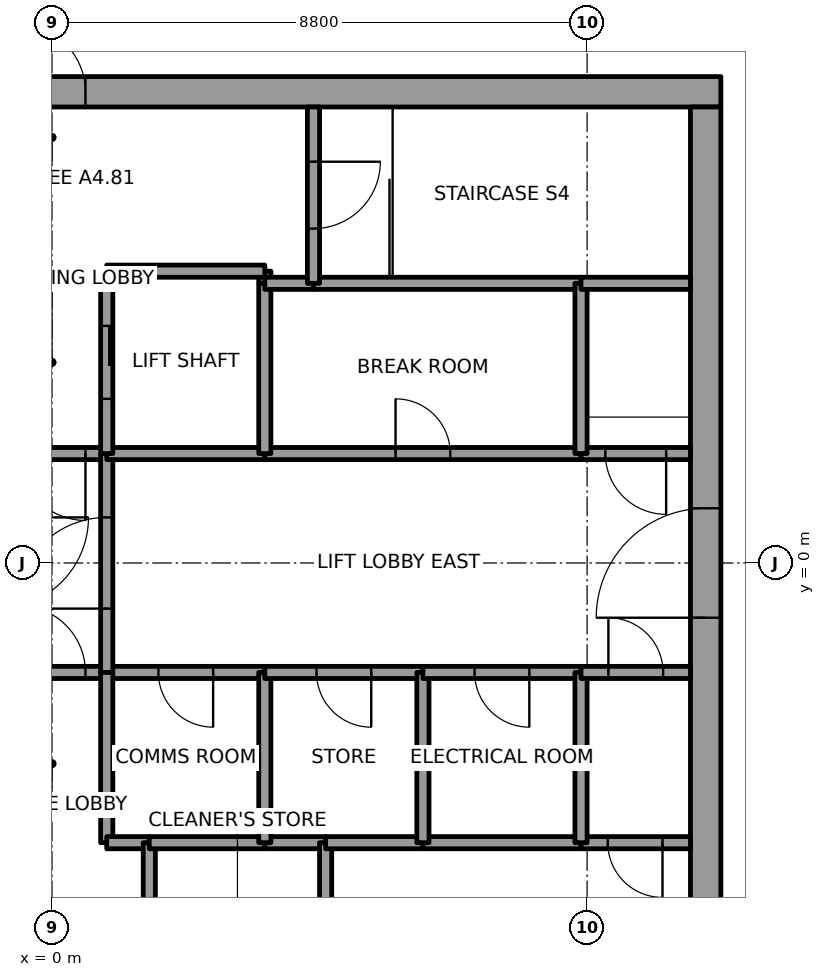
"""IFC4 building model, lengths in metres.
Left out: names, types, materials, properties, quantities, classifications, styles, units other than length and angle.
Written with IfcOpenShell. Run it as: python <this file> out.ifc"""

import sys

from ifc_helpers import new_model, si_unit, direction, frame, frame_2d, origin, place, context, subcontext, project, spatial, rectangle, extrude, element, fill, save


model = new_model("IFC4")
c1 = context("Model", 3, precision=1e-05, world=origin(), true_north=direction((0.0, 1.0)))
c2 = subcontext(c1, "Body", "Model", "MODEL_VIEW")
j1 = project(units=[si_unit("LENGTHUNIT", "METRE"), si_unit("PLANEANGLEUNIT", "RADIAN")], contexts=[c1])
p1 = place(None, origin())
s1 = spatial("IfcSite", under=j1, at=p1, CompositionType="ELEMENT")
p2 = place(p1, origin())
s2 = spatial("IfcBuilding", under=s1, at=p2, CompositionType="ELEMENT")
p3 = place(p2, frame((0.0, 0.0, 355.6)))
s3 = spatial("IfcBuildingStorey", under=s2, at=p3, CompositionType="ELEMENT", Elevation=355.6)
p4 = place(p3, frame((-11.0, 7.75, 0.0), z_axis=(0.0, 0.0, 1.0), x_axis=(1.0, 0.0, 0.0)))
e1 = element("IfcWall", 1, at=p4, inside=s3, PredefinedType="SHEAR", context=c2, shape_type="SweptSolid", body=[
    extrude(rectangle(XDim=22.0, YDim=0.5, at=frame_2d((11.0, 0.0))), origin(), (0.0, 0.0, 1.0), 5.4),
])
p5 = place(p4, frame((10.45, 0.0, 0.0)))
e2 = element("IfcOpeningElement", 2, at=p5, cuts=e1, PredefinedType="OPENING", context=c2, shape_type="SweptSolid", body=[
    extrude(rectangle(XDim=1.1, YDim=2.1, at=frame_2d((0.55, 1.05))), frame((0.0, 0.25, 0.0), z_axis=(0.0, -1.0, 0.0), x_axis=(1.0, 0.0, 0.0)), (0.0, 0.0, 1.0), 0.5),
])
p6 = place(p3, frame((10.75, -7.5, 0.0), z_axis=(0.0, 0.0, 1.0), x_axis=(0.0, 1.0, 0.0)))
e3 = element("IfcWall", 3, at=p6, inside=s3, PredefinedType="SHEAR", context=c2, shape_type="SweptSolid", body=[
    extrude(rectangle(XDim=15.0, YDim=0.5, at=frame_2d((7.5, 0.0))), origin(), (0.0, 0.0, 1.0), 5.4),
])
p7 = place(p6, frame((6.6, 0.0, 0.0)))
e4 = element("IfcOpeningElement", 4, at=p7, cuts=e3, PredefinedType="OPENING", context=c2, shape_type="SweptSolid", body=[
    extrude(rectangle(XDim=1.8, YDim=2.1, at=frame_2d((0.9, 1.05))), frame((0.0, 0.25, 0.0), z_axis=(0.0, -1.0, 0.0), x_axis=(1.0, 0.0, 0.0)), (0.0, 0.0, 1.0), 0.5),
])
p8 = place(p3, frame((-0.9, -1.8, 0.0), z_axis=(0.0, 0.0, 1.0), x_axis=(1.0, 0.0, 0.0)))
e5 = element("IfcWall", 5, at=p8, inside=s3, PredefinedType="SOLIDWALL", context=c2, shape_type="SweptSolid", body=[
    extrude(rectangle(XDim=1.8, YDim=0.2, at=frame_2d((0.9, 0.0))), origin(), (0.0, 0.0, 1.0), 5.25),
])
p9 = place(p8, frame((0.35, 0.0, 0.0)))
e6 = element("IfcOpeningElement", 6, at=p9, cuts=e5, PredefinedType="OPENING", context=c2, shape_type="SweptSolid", body=[
    extrude(rectangle(XDim=1.1, YDim=2.1, at=frame_2d((0.55, 1.05))), frame((0.0, 0.1, 0.0), z_axis=(0.0, -1.0, 0.0), x_axis=(1.0, 0.0, 0.0)), (0.0, 0.0, 1.0), 0.2),
])
p10 = place(p3, frame((0.9, 1.8, 0.0), z_axis=(0.0, 0.0, 1.0), x_axis=(-1.0, 0.0, 0.0)))
e7 = element("IfcWall", 7, at=p10, inside=s3, PredefinedType="SOLIDWALL", context=c2, shape_type="SweptSolid", body=[
    extrude(rectangle(XDim=1.8, YDim=0.2, at=frame_2d((0.9, 0.0))), origin(), (0.0, 0.0, 1.0), 5.25),
])
p11 = place(p10, frame((0.35, 0.0, 0.0)))
e8 = element("IfcOpeningElement", 8, at=p11, cuts=e7, PredefinedType="OPENING", context=c2, shape_type="SweptSolid", body=[
    extrude(rectangle(XDim=1.1, YDim=2.1, at=frame_2d((0.55, 1.05))), frame((0.0, 0.1, 0.0), z_axis=(0.0, -1.0, 0.0), x_axis=(1.0, 0.0, 0.0)), (0.0, 0.0, 1.0), 0.2),
])
p12 = place(p3, frame((3.5, -1.8, 0.0), z_axis=(0.0, 0.0, 1.0), x_axis=(-1.0, 0.0, 0.0)))
e9 = element("IfcWall", 9, at=p12, inside=s3, PredefinedType="SOLIDWALL", context=c2, shape_type="SweptSolid", body=[
    extrude(rectangle(XDim=2.6, YDim=0.2, at=frame_2d((1.3, 0.0))), origin(), (0.0, 0.0, 1.0), 5.25),
])
p13 = place(p12, frame((0.85, 0.0, 0.0)))
e10 = element("IfcOpeningElement", 10, at=p13, cuts=e9, PredefinedType="OPENING", context=c2, shape_type="SweptSolid", body=[
    extrude(rectangle(XDim=0.9, YDim=2.1, at=frame_2d((0.45, 1.05))), frame((0.0, 0.1, 0.0), z_axis=(0.0, -1.0, 0.0), x_axis=(1.0, 0.0, 0.0)), (0.0, 0.0, 1.0), 0.2),
])
p14 = place(p3, frame((0.9, -1.8, 0.0), z_axis=(0.0, 0.0, 1.0), x_axis=(0.0, 1.0, 0.0)))
e11 = element("IfcWall", 11, at=p14, inside=s3, PredefinedType="SOLIDWALL", context=c2, shape_type="SweptSolid", body=[
    extrude(rectangle(XDim=3.6, YDim=0.2, at=frame_2d((1.8, 0.0))), origin(), (0.0, 0.0, 1.0), 5.25),
])
p15 = place(p14, frame((1.05, 0.0, 0.0)))
e12 = element("IfcOpeningElement", 12, at=p15, cuts=e11, PredefinedType="OPENING", context=c2, shape_type="SweptSolid", body=[
    extrude(rectangle(XDim=1.5, YDim=2.1, at=frame_2d((0.75, 1.05))), frame((0.0, 0.1, 0.0), z_axis=(0.0, -1.0, 0.0), x_axis=(1.0, 0.0, 0.0)), (0.0, 0.0, 1.0), 0.2),
])
p16 = place(p3, frame((0.9, -1.8, 0.0), z_axis=(0.0, 0.0, 1.0), x_axis=(0.0, -1.0, 0.0)))
e13 = element("IfcWall", 13, at=p16, inside=s3, PredefinedType="SOLIDWALL", context=c2, shape_type="SweptSolid", body=[
    extrude(rectangle(XDim=2.8, YDim=0.2, at=frame_2d((1.4, 0.0))), origin(), (0.0, 0.0, 1.0), 5.25),
])
p17 = place(p3, frame((0.9, -4.6, 0.0), z_axis=(0.0, 0.0, 1.0), x_axis=(1.0, 0.0, 0.0)))
e14 = element("IfcWall", 14, at=p17, inside=s3, PredefinedType="SOLIDWALL", context=c2, shape_type="SweptSolid", body=[
    extrude(rectangle(XDim=0.7, YDim=0.2, at=frame_2d((0.35, 0.0))), origin(), (0.0, 0.0, 1.0), 5.25),
])
p18 = place(p3, frame((3.5, 1.8, 0.0), z_axis=(0.0, 0.0, 1.0), x_axis=(-1.0, 0.0, 0.0)))
e15 = element("IfcWall", 15, at=p18, inside=s3, PredefinedType="SOLIDWALL", context=c2, shape_type="SweptSolid", body=[
    extrude(rectangle(XDim=2.6, YDim=0.2, at=frame_2d((1.3, 0.0))), origin(), (0.0, 0.0, 1.0), 5.25),
])
p19 = place(p3, frame((3.5, 4.6, 0.0), z_axis=(0.0, 0.0, 1.0), x_axis=(0.0, 1.0, 0.0)))
e16 = element("IfcWall", 16, at=p19, inside=s3, PredefinedType="SOLIDWALL", context=c2, shape_type="SweptSolid", body=[
    extrude(rectangle(XDim=0.2, YDim=0.2, at=frame_2d((0.1, 0.0))), origin(), (0.0, 0.0, 1.0), 5.25),
])
p20 = place(p3, frame((3.5, 4.8, 0.0), z_axis=(0.0, 0.0, 1.0), x_axis=(-1.0, 0.0, 0.0)))
e17 = element("IfcWall", 17, at=p20, inside=s3, PredefinedType="SOLIDWALL", context=c2, shape_type="SweptSolid", body=[
    extrude(rectangle(XDim=2.6, YDim=0.2, at=frame_2d((1.3, 0.0))), origin(), (0.0, 0.0, 1.0), 5.25),
])
p21 = place(p3, frame((0.9, 4.8, 0.0), z_axis=(0.0, 0.0, 1.0), x_axis=(0.0, -1.0, 0.0)))
e18 = element("IfcWall", 18, at=p21, inside=s3, PredefinedType="SOLIDWALL", context=c2, shape_type="SweptSolid", body=[
    extrude(rectangle(XDim=3.0, YDim=0.2, at=frame_2d((1.5, 0.0))), origin(), (0.0, 0.0, 1.0), 5.25),
])
p22 = place(p21, frame((0.9, 0.0, 0.0)))
e19 = element("IfcOpeningElement", 19, at=p22, cuts=e18, PredefinedType="OPENING", context=c2, shape_type="SweptSolid", body=[
    extrude(rectangle(XDim=1.2, YDim=2.1, at=frame_2d((0.6, 1.05))), frame((0.0, 0.1, 0.0), z_axis=(0.0, -1.0, 0.0), x_axis=(1.0, 0.0, 0.0)), (0.0, 0.0, 1.0), 0.2),
])
p23 = place(p3, frame((1.6, -4.6, 0.0), z_axis=(0.0, 0.0, 1.0), x_axis=(0.0, -1.0, 0.0)))
e20 = element("IfcWall", 20, at=p23, inside=s3, PredefinedType="SOLIDWALL", context=c2, shape_type="SweptSolid", body=[
    extrude(rectangle(XDim=2.9, YDim=0.2, at=frame_2d((1.45, 0.0))), origin(), (0.0, 0.0, 1.0), 5.25),
])
p24 = place(p23, frame((1.0, 0.0, 0.0)))
e21 = element("IfcOpeningElement", 21, at=p24, cuts=e20, PredefinedType="OPENING", context=c2, shape_type="SweptSolid", body=[
    extrude(rectangle(XDim=0.9, YDim=2.1, at=frame_2d((0.45, 1.05))), frame((0.0, 0.1, 0.0), z_axis=(0.0, -1.0, 0.0), x_axis=(1.0, 0.0, 0.0)), (0.0, 0.0, 1.0), 0.2),
])
p25 = place(p3, frame((1.6, -4.6, 0.0), z_axis=(0.0, 0.0, 1.0), x_axis=(1.0, 0.0, 0.0)))
e22 = element("IfcWall", 22, at=p25, inside=s3, PredefinedType="SOLIDWALL", context=c2, shape_type="SweptSolid", body=[
    extrude(rectangle(XDim=1.9, YDim=0.2, at=frame_2d((0.95, 0.0))), origin(), (0.0, 0.0, 1.0), 5.25),
])
p26 = place(p3, frame((3.5, -4.6, 0.0), z_axis=(0.0, 0.0, 1.0), x_axis=(1.0, 0.0, 0.0)))
e23 = element("IfcWall", 23, at=p26, inside=s3, PredefinedType="SOLIDWALL", context=c2, shape_type="SweptSolid", body=[
    extrude(rectangle(XDim=1.0, YDim=0.2, at=frame_2d((0.5, 0.0))), origin(), (0.0, 0.0, 1.0), 5.25),
])
p27 = place(p3, frame((3.5, -4.6, 0.0), z_axis=(0.0, 0.0, 1.0), x_axis=(0.0, 1.0, 0.0)))
e24 = element("IfcWall", 24, at=p27, inside=s3, PredefinedType="SOLIDWALL", context=c2, shape_type="SweptSolid", body=[
    extrude(rectangle(XDim=2.8, YDim=0.2, at=frame_2d((1.4, 0.0))), origin(), (0.0, 0.0, 1.0), 5.25),
])
p28 = place(p3, frame((6.1, -1.8, 0.0), z_axis=(0.0, 0.0, 1.0), x_axis=(-1.0, 0.0, 0.0)))
e25 = element("IfcWall", 25, at=p28, inside=s3, PredefinedType="SOLIDWALL", context=c2, shape_type="SweptSolid", body=[
    extrude(rectangle(XDim=2.6, YDim=0.2, at=frame_2d((1.3, 0.0))), origin(), (0.0, 0.0, 1.0), 5.25),
])
p29 = place(p28, frame((0.85, 0.0, 0.0)))
e26 = element("IfcOpeningElement", 26, at=p29, cuts=e25, PredefinedType="OPENING", context=c2, shape_type="SweptSolid", body=[
    extrude(rectangle(XDim=0.9, YDim=2.1, at=frame_2d((0.45, 1.05))), frame((0.0, 0.1, 0.0), z_axis=(0.0, -1.0, 0.0), x_axis=(1.0, 0.0, 0.0)), (0.0, 0.0, 1.0), 0.2),
])
p30 = place(p3, frame((3.5, 1.8, 0.0), z_axis=(0.0, 0.0, 1.0), x_axis=(1.0, 0.0, 0.0)))
e27 = element("IfcWall", 27, at=p30, inside=s3, PredefinedType="SOLIDWALL", context=c2, shape_type="SweptSolid", body=[
    extrude(rectangle(XDim=5.2, YDim=0.2, at=frame_2d((2.6, 0.0))), origin(), (0.0, 0.0, 1.0), 5.25),
])
p31 = place(p30, frame((2.15, 0.0, 0.0)))
e28 = element("IfcOpeningElement", 28, at=p31, cuts=e27, PredefinedType="OPENING", context=c2, shape_type="SweptSolid", body=[
    extrude(rectangle(XDim=0.9, YDim=2.1, at=frame_2d((0.45, 1.05))), frame((0.0, 0.1, 0.0), z_axis=(0.0, -1.0, 0.0), x_axis=(1.0, 0.0, 0.0)), (0.0, 0.0, 1.0), 0.2),
])
p32 = place(p3, frame((3.5, 4.6, 0.0), z_axis=(0.0, 0.0, 1.0), x_axis=(0.0, -1.0, 0.0)))
e29 = element("IfcWall", 29, at=p32, inside=s3, PredefinedType="SOLIDWALL", context=c2, shape_type="SweptSolid", body=[
    extrude(rectangle(XDim=2.8, YDim=0.2, at=frame_2d((1.4, 0.0))), origin(), (0.0, 0.0, 1.0), 5.25),
])
p33 = place(p3, frame((4.3, 4.6, 0.0), z_axis=(0.0, 0.0, 1.0), x_axis=(-1.0, 0.0, 0.0)))
e30 = element("IfcWall", 30, at=p33, inside=s3, PredefinedType="SOLIDWALL", context=c2, shape_type="SweptSolid", body=[
    extrude(rectangle(XDim=0.8, YDim=0.2, at=frame_2d((0.4, 0.0))), origin(), (0.0, 0.0, 1.0), 5.25),
])
p34 = place(p3, frame((8.7, 4.6, 0.0), z_axis=(0.0, 0.0, 1.0), x_axis=(-1.0, 0.0, 0.0)))
e31 = element("IfcWall", 31, at=p34, inside=s3, PredefinedType="SOLIDWALL", context=c2, shape_type="SweptSolid", body=[
    extrude(rectangle(XDim=4.4, YDim=0.2, at=frame_2d((2.2, 0.0))), origin(), (0.0, 0.0, 1.0), 5.25),
])
p35 = place(p3, frame((4.3, 7.5, 0.0), z_axis=(0.0, 0.0, 1.0), x_axis=(0.0, -1.0, 0.0)))
e32 = element("IfcWall", 32, at=p35, inside=s3, PredefinedType="SOLIDWALL", context=c2, shape_type="SweptSolid", body=[
    extrude(rectangle(XDim=2.9, YDim=0.2, at=frame_2d((1.45, 0.0))), origin(), (0.0, 0.0, 1.0), 5.25),
])
p36 = place(p35, frame((0.9, 0.0, 0.0)))
e33 = element("IfcOpeningElement", 33, at=p36, cuts=e32, PredefinedType="OPENING", context=c2, shape_type="SweptSolid", body=[
    extrude(rectangle(XDim=1.1, YDim=2.1, at=frame_2d((0.55, 1.05))), frame((0.0, 0.1, 0.0), z_axis=(0.0, -1.0, 0.0), x_axis=(1.0, 0.0, 0.0)), (0.0, 0.0, 1.0), 0.2),
])
p37 = place(p3, frame((4.5, -4.6, 0.0), z_axis=(0.0, 0.0, 1.0), x_axis=(0.0, -1.0, 0.0)))
e34 = element("IfcWall", 34, at=p37, inside=s3, PredefinedType="SOLIDWALL", context=c2, shape_type="SweptSolid", body=[
    extrude(rectangle(XDim=2.9, YDim=0.2, at=frame_2d((1.45, 0.0))), origin(), (0.0, 0.0, 1.0), 5.25),
])
p38 = place(p3, frame((4.5, -4.6, 0.0), z_axis=(0.0, 0.0, 1.0), x_axis=(1.0, 0.0, 0.0)))
e35 = element("IfcWall", 35, at=p38, inside=s3, PredefinedType="SOLIDWALL", context=c2, shape_type="SweptSolid", body=[
    extrude(rectangle(XDim=1.6, YDim=0.2, at=frame_2d((0.8, 0.0))), origin(), (0.0, 0.0, 1.0), 5.25),
])
p39 = place(p3, frame((6.1, -4.6, 0.0), z_axis=(0.0, 0.0, 1.0), x_axis=(1.0, 0.0, 0.0)))
e36 = element("IfcWall", 36, at=p39, inside=s3, PredefinedType="SOLIDWALL", context=c2, shape_type="SweptSolid", body=[
    extrude(rectangle(XDim=2.6, YDim=0.2, at=frame_2d((1.3, 0.0))), origin(), (0.0, 0.0, 1.0), 5.25),
])
p40 = place(p3, frame((6.1, -4.6, 0.0), z_axis=(0.0, 0.0, 1.0), x_axis=(0.0, 1.0, 0.0)))
e37 = element("IfcWall", 37, at=p40, inside=s3, PredefinedType="SOLIDWALL", context=c2, shape_type="SweptSolid", body=[
    extrude(rectangle(XDim=2.8, YDim=0.2, at=frame_2d((1.4, 0.0))), origin(), (0.0, 0.0, 1.0), 5.25),
])
p41 = place(p3, frame((8.7, -1.8, 0.0), z_axis=(0.0, 0.0, 1.0), x_axis=(-1.0, 0.0, 0.0)))
e38 = element("IfcWall", 38, at=p41, inside=s3, PredefinedType="SOLIDWALL", context=c2, shape_type="SweptSolid", body=[
    extrude(rectangle(XDim=2.6, YDim=0.2, at=frame_2d((1.3, 0.0))), origin(), (0.0, 0.0, 1.0), 5.25),
])
p42 = place(p41, frame((0.85, 0.0, 0.0)))
e39 = element("IfcOpeningElement", 39, at=p42, cuts=e38, PredefinedType="OPENING", context=c2, shape_type="SweptSolid", body=[
    extrude(rectangle(XDim=0.9, YDim=2.1, at=frame_2d((0.45, 1.05))), frame((0.0, 0.1, 0.0), z_axis=(0.0, -1.0, 0.0), x_axis=(1.0, 0.0, 0.0)), (0.0, 0.0, 1.0), 0.2),
])
p43 = place(p3, frame((10.5, -4.6, 0.0), z_axis=(0.0, 0.0, 1.0), x_axis=(-1.0, 0.0, 0.0)))
e40 = element("IfcWall", 40, at=p43, inside=s3, PredefinedType="SOLIDWALL", context=c2, shape_type="SweptSolid", body=[
    extrude(rectangle(XDim=1.8, YDim=0.2, at=frame_2d((0.9, 0.0))), origin(), (0.0, 0.0, 1.0), 5.25),
])
p44 = place(p43, frame((0.46, 0.0, 0.0)))
e41 = element("IfcOpeningElement", 41, at=p44, cuts=e40, PredefinedType="OPENING", context=c2, shape_type="SweptSolid", body=[
    extrude(rectangle(XDim=0.9, YDim=2.1, at=frame_2d((0.45, 1.05))), frame((0.0, 0.1, 0.0), z_axis=(0.0, -1.0, 0.0), x_axis=(1.0, 0.0, 0.0)), (0.0, 0.0, 1.0), 0.2),
])
p45 = place(p3, frame((8.7, -4.6, 0.0), z_axis=(0.0, 0.0, 1.0), x_axis=(0.0, 1.0, 0.0)))
e42 = element("IfcWall", 42, at=p45, inside=s3, PredefinedType="SOLIDWALL", context=c2, shape_type="SweptSolid", body=[
    extrude(rectangle(XDim=2.8, YDim=0.2, at=frame_2d((1.4, 0.0))), origin(), (0.0, 0.0, 1.0), 5.25),
])
p46 = place(p3, frame((8.7, -1.8, 0.0), z_axis=(0.0, 0.0, 1.0), x_axis=(1.0, 0.0, 0.0)))
e43 = element("IfcWall", 43, at=p46, inside=s3, PredefinedType="SOLIDWALL", context=c2, shape_type="SweptSolid", body=[
    extrude(rectangle(XDim=1.8, YDim=0.2, at=frame_2d((0.9, 0.0))), origin(), (0.0, 0.0, 1.0), 5.25),
])
p47 = place(p46, frame((0.45, 0.0, 0.0)))
e44 = element("IfcOpeningElement", 44, at=p47, cuts=e43, PredefinedType="OPENING", context=c2, shape_type="SweptSolid", body=[
    extrude(rectangle(XDim=0.9, YDim=2.1, at=frame_2d((0.45, 1.05))), frame((0.0, 0.1, 0.0), z_axis=(0.0, -1.0, 0.0), x_axis=(1.0, 0.0, 0.0)), (0.0, 0.0, 1.0), 0.2),
])
p48 = place(p3, frame((10.5, 1.8, 0.0), z_axis=(0.0, 0.0, 1.0), x_axis=(-1.0, 0.0, 0.0)))
e45 = element("IfcWall", 45, at=p48, inside=s3, PredefinedType="SOLIDWALL", context=c2, shape_type="SweptSolid", body=[
    extrude(rectangle(XDim=1.8, YDim=0.2, at=frame_2d((0.9, 0.0))), origin(), (0.0, 0.0, 1.0), 5.25),
])
p49 = place(p48, frame((0.4, 0.0, 0.0)))
e46 = element("IfcOpeningElement", 46, at=p49, cuts=e45, PredefinedType="OPENING", context=c2, shape_type="SweptSolid", body=[
    extrude(rectangle(XDim=1.0, YDim=2.1, at=frame_2d((0.5, 1.05))), frame((0.0, 0.1, 0.0), z_axis=(0.0, -1.0, 0.0), x_axis=(1.0, 0.0, 0.0)), (0.0, 0.0, 1.0), 0.2),
])
p50 = place(p3, frame((8.7, 1.8, 0.0), z_axis=(0.0, 0.0, 1.0), x_axis=(0.0, 1.0, 0.0)))
e47 = element("IfcWall", 47, at=p50, inside=s3, PredefinedType="SOLIDWALL", context=c2, shape_type="SweptSolid", body=[
    extrude(rectangle(XDim=2.8, YDim=0.2, at=frame_2d((1.4, 0.0))), origin(), (0.0, 0.0, 1.0), 5.25),
])
p51 = place(p3, frame((10.5, 4.6, 0.0), z_axis=(0.0, 0.0, 1.0), x_axis=(-1.0, 0.0, 0.0)))
e48 = element("IfcWall", 48, at=p51, inside=s3, PredefinedType="SOLIDWALL", context=c2, shape_type="SweptSolid", body=[
    extrude(rectangle(XDim=1.8, YDim=0.2, at=frame_2d((0.9, 0.0))), origin(), (0.0, 0.0, 1.0), 5.25),
])
p52 = place(p22, origin())
e49 = element("IfcDoor", 49, at=p52, inside=s3, OperationType="SLIDING_TO_LEFT", PredefinedType="DOOR", context=c2, shape_type="SweptSolid", body=[
    extrude(rectangle(XDim=1.2, YDim=2.1, at=frame_2d((0.6, 1.05))), frame((0.0, 0.025, 0.0), z_axis=(0.0, -1.0, 0.0), x_axis=(1.0, 0.0, 0.0)), (0.0, 0.0, 1.0), 0.05),
])
fill(e19, e49)
p53 = place(p15, origin())
e50 = element("IfcDoor", 50, at=p53, inside=s3, OperationType="DOUBLE_DOOR_SINGLE_SWING", PredefinedType="DOOR", context=c2, shape_type="SweptSolid", body=[
    extrude(rectangle(XDim=1.5, YDim=2.1, at=frame_2d((0.75, 1.05))), frame((0.0, 0.025, 0.0), z_axis=(0.0, -1.0, 0.0), x_axis=(1.0, 0.0, 0.0)), (0.0, 0.0, 1.0), 0.05),
])
fill(e12, e50)
p54 = place(p11, origin())
e51 = element("IfcDoor", 51, at=p54, inside=s3, OperationType="SINGLE_SWING_RIGHT", PredefinedType="DOOR", context=c2, shape_type="SweptSolid", body=[
    extrude(rectangle(XDim=1.1, YDim=2.1, at=frame_2d((0.55, 1.05))), frame((0.0, 0.025, 0.0), z_axis=(0.0, -1.0, 0.0), x_axis=(1.0, 0.0, 0.0)), (0.0, 0.0, 1.0), 0.05),
])
fill(e8, e51)
p55 = place(p9, origin())
e52 = element("IfcDoor", 52, at=p55, inside=s3, OperationType="SINGLE_SWING_RIGHT", PredefinedType="DOOR", context=c2, shape_type="SweptSolid", body=[
    extrude(rectangle(XDim=1.1, YDim=2.1, at=frame_2d((0.55, 1.05))), frame((0.0, 0.025, 0.0), z_axis=(0.0, -1.0, 0.0), x_axis=(1.0, 0.0, 0.0)), (0.0, 0.0, 1.0), 0.05),
])
fill(e6, e52)
p56 = place(p49, origin())
e53 = element("IfcDoor", 53, at=p56, inside=s3, OperationType="SINGLE_SWING_LEFT", PredefinedType="DOOR", context=c2, shape_type="SweptSolid", body=[
    extrude(rectangle(XDim=1.0, YDim=2.1, at=frame_2d((0.5, 1.05))), frame((0.0, 0.025, 0.0), z_axis=(0.0, -1.0, 0.0), x_axis=(1.0, 0.0, 0.0)), (0.0, 0.0, 1.0), 0.05),
])
fill(e46, e53)
p57 = place(p36, origin())
e54 = element("IfcDoor", 54, at=p57, inside=s3, OperationType="SINGLE_SWING_RIGHT", PredefinedType="DOOR", context=c2, shape_type="SweptSolid", body=[
    extrude(rectangle(XDim=1.1, YDim=2.1, at=frame_2d((0.55, 1.05))), frame((0.0, 0.025, 0.0), z_axis=(0.0, -1.0, 0.0), x_axis=(1.0, 0.0, 0.0)), (0.0, 0.0, 1.0), 0.05),
])
fill(e33, e54)
p58 = place(p31, origin())
e55 = element("IfcDoor", 55, at=p58, inside=s3, OperationType="SINGLE_SWING_RIGHT", PredefinedType="DOOR", context=c2, shape_type="SweptSolid", body=[
    extrude(rectangle(XDim=0.9, YDim=2.1, at=frame_2d((0.45, 1.05))), frame((0.0, 0.025, 0.0), z_axis=(0.0, -1.0, 0.0), x_axis=(1.0, 0.0, 0.0)), (0.0, 0.0, 1.0), 0.05),
])
fill(e28, e55)
p59 = place(p13, origin())
e56 = element("IfcDoor", 56, at=p59, inside=s3, OperationType="SINGLE_SWING_LEFT", PredefinedType="DOOR", context=c2, shape_type="SweptSolid", body=[
    extrude(rectangle(XDim=0.9, YDim=2.1, at=frame_2d((0.45, 1.05))), frame((0.0, 0.025, 0.0), z_axis=(0.0, -1.0, 0.0), x_axis=(1.0, 0.0, 0.0)), (0.0, 0.0, 1.0), 0.05),
])
fill(e10, e56)
p60 = place(p29, origin())
e57 = element("IfcDoor", 57, at=p60, inside=s3, OperationType="SINGLE_SWING_LEFT", PredefinedType="DOOR", context=c2, shape_type="SweptSolid", body=[
    extrude(rectangle(XDim=0.9, YDim=2.1, at=frame_2d((0.45, 1.05))), frame((0.0, 0.025, 0.0), z_axis=(0.0, -1.0, 0.0), x_axis=(1.0, 0.0, 0.0)), (0.0, 0.0, 1.0), 0.05),
])
fill(e26, e57)
p61 = place(p42, origin())
e58 = element("IfcDoor", 58, at=p61, inside=s3, OperationType="SINGLE_SWING_LEFT", PredefinedType="DOOR", context=c2, shape_type="SweptSolid", body=[
    extrude(rectangle(XDim=0.9, YDim=2.1, at=frame_2d((0.45, 1.05))), frame((0.0, 0.025, 0.0), z_axis=(0.0, -1.0, 0.0), x_axis=(1.0, 0.0, 0.0)), (0.0, 0.0, 1.0), 0.05),
])
fill(e39, e58)
p62 = place(p44, origin())
e59 = element("IfcDoor", 59, at=p62, inside=s3, OperationType="SINGLE_SWING_RIGHT", PredefinedType="DOOR", context=c2, shape_type="SweptSolid", body=[
    extrude(rectangle(XDim=0.9, YDim=2.1, at=frame_2d((0.45, 1.05))), frame((0.0, 0.025, 0.0), z_axis=(0.0, -1.0, 0.0), x_axis=(1.0, 0.0, 0.0)), (0.0, 0.0, 1.0), 0.05),
])
fill(e41, e59)
p63 = place(p47, origin())
e60 = element("IfcDoor", 60, at=p63, inside=s3, OperationType="SINGLE_SWING_RIGHT", PredefinedType="DOOR", context=c2, shape_type="SweptSolid", body=[
    extrude(rectangle(XDim=0.9, YDim=2.1, at=frame_2d((0.45, 1.05))), frame((0.0, 0.025, 0.0), z_axis=(0.0, -1.0, 0.0), x_axis=(1.0, 0.0, 0.0)), (0.0, 0.0, 1.0), 0.05),
])
fill(e44, e60)
p64 = place(p7, origin())
e61 = element("IfcDoor", 61, at=p64, inside=s3, OperationType="DOUBLE_DOOR_SINGLE_SWING", PredefinedType="DOOR", context=c2, shape_type="SweptSolid", body=[
    extrude(rectangle(XDim=1.8, YDim=2.1, at=frame_2d((0.9, 1.05))), frame((0.0, 0.025, 0.0), z_axis=(0.0, -1.0, 0.0), x_axis=(1.0, 0.0, 0.0)), (0.0, 0.0, 1.0), 0.05),
])
fill(e4, e61)
p65 = place(p5, origin())
e62 = element("IfcDoor", 62, at=p65, inside=s3, OperationType="SINGLE_SWING_LEFT", PredefinedType="DOOR", context=c2, shape_type="SweptSolid", body=[
    extrude(rectangle(XDim=1.1, YDim=2.1, at=frame_2d((0.55, 1.05))), frame((0.0, 0.025, 0.0), z_axis=(0.0, -1.0, 0.0), x_axis=(1.0, 0.0, 0.0)), (0.0, 0.0, 1.0), 0.05),
])
fill(e2, e62)
save(model, sys.argv[1])
